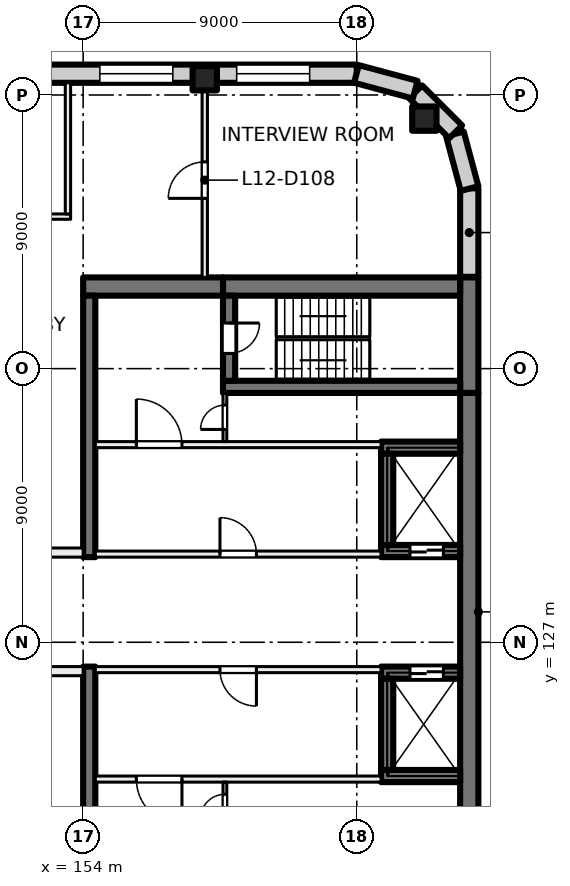
"""IFC4 building model, lengths in metres.
Left out: names, types, materials, properties, quantities, classifications, styles, units other than length and angle.
Written with IfcOpenShell. Run it as: python <this file> out.ifc"""

import sys

from ifc_helpers import new_model, si_unit, direction, frame, frame_2d, origin, origin_2d, place, context, subcontext, project, spatial, rectangle, extrude, element, fill, save


model = new_model("IFC4")
c1 = context("Model", 3, precision=1e-05, world=origin(), true_north=direction((0.0, 1.0)))
c2 = subcontext(c1, "Body", "Model", "MODEL_VIEW")
j1 = project(units=[si_unit("LENGTHUNIT", "METRE"), si_unit("PLANEANGLEUNIT", "RADIAN")], contexts=[c1])
p1 = place(None, origin())
s1 = spatial("IfcSite", under=j1, at=p1, CompositionType="ELEMENT")
p2 = place(p1, origin())
s2 = spatial("IfcBuilding", under=s1, at=p2, CompositionType="ELEMENT")
p3 = place(p2, frame((0.0, 0.0, 55.5)))
s3 = spatial("IfcBuildingStorey", under=s2, at=p3, CompositionType="ELEMENT", Elevation=55.5)
for number, where, z_axis, x_axis in (
    (1, (165.223, 144.223, 0.0), (0.0, 0.0, 1.0), (1.0, 0.0, 0.0)),
    (2, (158.0, 145.55, 0.0), (0.0, 0.0, 1.0), (1.0, 0.0, 0.0)),
):
    element("IfcColumn", number, at=place(p3, frame(where, z_axis=z_axis, x_axis=x_axis)), inside=s3, PredefinedType="COLUMN", context=c2, shape_type="SweptSolid", body=[
        extrude(rectangle(XDim=0.8, YDim=0.8, at=origin_2d()), origin(), (0.0, 0.0, 1.0), 4.0),
    ])
p4 = place(p3, frame((166.7, 139.0, 0.0), z_axis=(0.0, 0.0, 1.0), x_axis=(0.0, -1.0, 0.0)))
e3 = element("IfcWall", 3, at=p4, inside=s3, PredefinedType="SHEAR", context=c2, shape_type="SweptSolid", body=[
    extrude(rectangle(XDim=3.8, YDim=0.6, at=frame_2d((1.9, 0.0))), origin(), (0.0, 0.0, 1.0), 4.0),
])
p5 = place(p3, frame((166.7, 135.2, 0.0), z_axis=(0.0, 0.0, 1.0), x_axis=(0.0, -1.0, 0.0)))
e4 = element("IfcWall", 4, at=p5, inside=s3, PredefinedType="SHEAR", context=c2, shape_type="SweptSolid", body=[
    extrude(rectangle(XDim=14.4, YDim=0.6, at=frame_2d((7.2, 0.0))), origin(), (0.0, 0.0, 1.0), 4.0),
])
p6 = place(p3, frame((166.4, 138.7, 0.0), z_axis=(0.0, 0.0, 1.0), x_axis=(-1.0, 0.0, 0.0)))
e5 = element("IfcWall", 5, at=p6, inside=s3, PredefinedType="SHEAR", context=c2, shape_type="SweptSolid", body=[
    extrude(rectangle(XDim=7.8, YDim=0.6, at=frame_2d((3.9, 0.0))), origin(), (0.0, 0.0, 1.0), 4.0),
])
p7 = place(p3, frame((158.6, 138.7, 0.0), z_axis=(0.0, 0.0, 1.0), x_axis=(-1.0, 0.0, 0.0)))
e6 = element("IfcWall", 6, at=p7, inside=s3, PredefinedType="SHEAR", context=c2, shape_type="SweptSolid", body=[
    extrude(rectangle(XDim=4.6, YDim=0.6, at=frame_2d((2.3, 0.0))), origin(), (0.0, 0.0, 1.0), 4.0),
])
p8 = place(p3, frame((166.4, 135.4, 0.0), z_axis=(0.0, 0.0, 1.0), x_axis=(-1.0, 0.0, 0.0)))
e7 = element("IfcWall", 7, at=p8, inside=s3, PredefinedType="SHEAR", context=c2, shape_type="SweptSolid", body=[
    extrude(rectangle(XDim=7.8, YDim=0.4, at=frame_2d((3.9, 0.0))), origin(), (0.0, 0.0, 1.0), 4.0),
])
p9 = place(p3, frame((158.8, 138.4, 0.0), z_axis=(0.0, 0.0, 1.0), x_axis=(0.0, -1.0, 0.0)))
e8 = element("IfcWall", 8, at=p9, inside=s3, PredefinedType="SHEAR", context=c2, shape_type="SweptSolid", body=[
    extrude(rectangle(XDim=2.8, YDim=0.4, at=frame_2d((1.4, 0.0))), origin(), (0.0, 0.0, 1.0), 4.0),
])
p10 = place(p9, frame((0.9, 0.0, 0.0)))
e9 = element("IfcOpeningElement", 9, at=p10, cuts=e8, PredefinedType="OPENING", context=c2, shape_type="SweptSolid", body=[
    extrude(rectangle(XDim=1.0, YDim=2.1, at=frame_2d((0.5, 1.05))), frame((0.0, 0.21, 0.0), z_axis=(0.0, -1.0, 0.0), x_axis=(1.0, 0.0, 0.0)), (0.0, 0.0, 1.0), 0.42),
])
p11 = place(p3, frame((166.4, 130.0, 0.0), z_axis=(0.0, 0.0, 1.0), x_axis=(-1.0, 0.0, 0.0)))
e10 = element("IfcWall", 10, at=p11, inside=s3, PredefinedType="SHEAR", context=c2, shape_type="SweptSolid", body=[
    extrude(rectangle(XDim=2.6, YDim=0.4, at=frame_2d((1.3, 0.0))), origin(), (0.0, 0.0, 1.0), 4.0),
])
p12 = place(p11, frame((0.55, 0.0, 0.0)))
e11 = element("IfcOpeningElement", 11, at=p12, cuts=e10, PredefinedType="OPENING", context=c2, shape_type="SweptSolid", body=[
    extrude(rectangle(XDim=1.1, YDim=2.1, at=frame_2d((0.55, 1.05))), frame((0.0, 0.21, 0.0), z_axis=(0.0, -1.0, 0.0), x_axis=(1.0, 0.0, 0.0)), (0.0, 0.0, 1.0), 0.42),
])
p13 = place(p3, frame((166.4, 133.4, 0.0), z_axis=(0.0, 0.0, 1.0), x_axis=(-1.0, 0.0, 0.0)))
e12 = element("IfcWall", 12, at=p13, inside=s3, PredefinedType="SHEAR", context=c2, shape_type="SweptSolid", body=[
    extrude(rectangle(XDim=2.6, YDim=0.4, at=frame_2d((1.3, 0.0))), origin(), (0.0, 0.0, 1.0), 4.0),
])
p14 = place(p3, frame((164.0, 133.2, 0.0), z_axis=(0.0, 0.0, 1.0), x_axis=(0.0, -1.0, 0.0)))
e13 = element("IfcWall", 13, at=p14, inside=s3, PredefinedType="SHEAR", context=c2, shape_type="SweptSolid", body=[
    extrude(rectangle(XDim=3.0, YDim=0.4, at=frame_2d((1.5, 0.0))), origin(), (0.0, 0.0, 1.0), 4.0),
])
p15 = place(p3, frame((166.4, 126.0, 0.0), z_axis=(0.0, 0.0, 1.0), x_axis=(-1.0, 0.0, 0.0)))
e14 = element("IfcWall", 14, at=p15, inside=s3, PredefinedType="SHEAR", context=c2, shape_type="SweptSolid", body=[
    extrude(rectangle(XDim=2.6, YDim=0.4, at=frame_2d((1.3, 0.0))), origin(), (0.0, 0.0, 1.0), 4.0),
])
p16 = place(p15, frame((0.55, 0.0, 0.0)))
e15 = element("IfcOpeningElement", 15, at=p16, cuts=e14, PredefinedType="OPENING", context=c2, shape_type="SweptSolid", body=[
    extrude(rectangle(XDim=1.1, YDim=2.1, at=frame_2d((0.55, 1.05))), frame((0.0, 0.21, 0.0), z_axis=(0.0, -1.0, 0.0), x_axis=(1.0, 0.0, 0.0)), (0.0, 0.0, 1.0), 0.42),
])
p17 = place(p3, frame((166.4, 122.6, 0.0), z_axis=(0.0, 0.0, 1.0), x_axis=(-1.0, 0.0, 0.0)))
e16 = element("IfcWall", 16, at=p17, inside=s3, PredefinedType="SHEAR", context=c2, shape_type="SweptSolid", body=[
    extrude(rectangle(XDim=2.6, YDim=0.4, at=frame_2d((1.3, 0.0))), origin(), (0.0, 0.0, 1.0), 4.0),
])
p18 = place(p3, frame((164.0, 125.8, 0.0), z_axis=(0.0, 0.0, 1.0), x_axis=(0.0, -1.0, 0.0)))
e17 = element("IfcWall", 17, at=p18, inside=s3, PredefinedType="SHEAR", context=c2, shape_type="SweptSolid", body=[
    extrude(rectangle(XDim=3.0, YDim=0.4, at=frame_2d((1.5, 0.0))), origin(), (0.0, 0.0, 1.0), 4.0),
])
for number, where, z_axis, x_axis in (
    (18, (154.2, 138.4, 0.0), (0.0, 0.0, 1.0), (0.0, -1.0, 0.0)),
    (19, (154.2, 126.2, 0.0), (0.0, 0.0, 1.0), (0.0, -1.0, 0.0)),
):
    element("IfcWall", number, at=place(p3, frame(where, z_axis=z_axis, x_axis=x_axis)), inside=s3, PredefinedType="SHEAR", context=c2, shape_type="SweptSolid", body=[
        extrude(rectangle(XDim=8.6, YDim=0.4, at=frame_2d((4.3, 0.0))), origin(), (0.0, 0.0, 1.0), 4.0),
    ])
p19 = place(p3, frame((131.07, 145.7, 0.0), z_axis=(0.0, 0.0, 1.0), x_axis=(1.0, 0.0, 0.0)))
e20 = element("IfcWall", 20, at=p19, inside=s3, PredefinedType="SOLIDWALL", context=c2, shape_type="SweptSolid", body=[
    extrude(rectangle(XDim=31.93, YDim=0.6, at=frame_2d((15.965, 0.0))), origin(), (0.0, 0.0, 1.0), 3.625),
])
p20 = place(p19, frame((0.98, 0.0, 0.9)))
e21 = element("IfcOpeningElement", 21, at=p20, cuts=e20, PredefinedType="OPENING", context=c2, shape_type="SweptSolid", body=[
    extrude(rectangle(XDim=2.4, YDim=2.4, at=frame_2d((1.2, 1.2))), frame((0.0, 0.31, 0.0), z_axis=(0.0, -1.0, 0.0), x_axis=(1.0, 0.0, 0.0)), (0.0, 0.0, 1.0), 0.62),
])
p21 = place(p19, frame((5.48, 0.0, 0.9)))
e22 = element("IfcOpeningElement", 22, at=p21, cuts=e20, PredefinedType="OPENING", context=c2, shape_type="SweptSolid", body=[
    extrude(rectangle(XDim=2.4, YDim=2.4, at=frame_2d((1.2, 1.2))), frame((0.0, 0.31, 0.0), z_axis=(0.0, -1.0, 0.0), x_axis=(1.0, 0.0, 0.0)), (0.0, 0.0, 1.0), 0.62),
])
p22 = place(p19, frame((9.98, 0.0, 0.9)))
e23 = element("IfcOpeningElement", 23, at=p22, cuts=e20, PredefinedType="OPENING", context=c2, shape_type="SweptSolid", body=[
    extrude(rectangle(XDim=2.4, YDim=2.4, at=frame_2d((1.2, 1.2))), frame((0.0, 0.31, 0.0), z_axis=(0.0, -1.0, 0.0), x_axis=(1.0, 0.0, 0.0)), (0.0, 0.0, 1.0), 0.62),
])
p23 = place(p19, frame((14.48, 0.0, 0.9)))
e24 = element("IfcOpeningElement", 24, at=p23, cuts=e20, PredefinedType="OPENING", context=c2, shape_type="SweptSolid", body=[
    extrude(rectangle(XDim=2.4, YDim=2.4, at=frame_2d((1.2, 1.2))), frame((0.0, 0.31, 0.0), z_axis=(0.0, -1.0, 0.0), x_axis=(1.0, 0.0, 0.0)), (0.0, 0.0, 1.0), 0.62),
])
p24 = place(p19, frame((18.98, 0.0, 0.9)))
e25 = element("IfcOpeningElement", 25, at=p24, cuts=e20, PredefinedType="OPENING", context=c2, shape_type="SweptSolid", body=[
    extrude(rectangle(XDim=2.4, YDim=2.4, at=frame_2d((1.2, 1.2))), frame((0.0, 0.31, 0.0), z_axis=(0.0, -1.0, 0.0), x_axis=(1.0, 0.0, 0.0)), (0.0, 0.0, 1.0), 0.62),
])
p25 = place(p19, frame((23.48, 0.0, 0.9)))
e26 = element("IfcOpeningElement", 26, at=p25, cuts=e20, PredefinedType="OPENING", context=c2, shape_type="SweptSolid", body=[
    extrude(rectangle(XDim=2.4, YDim=2.4, at=frame_2d((1.2, 1.2))), frame((0.0, 0.31, 0.0), z_axis=(0.0, -1.0, 0.0), x_axis=(1.0, 0.0, 0.0)), (0.0, 0.0, 1.0), 0.62),
])
p26 = place(p19, frame((27.98, 0.0, 0.9)))
e27 = element("IfcOpeningElement", 27, at=p26, cuts=e20, PredefinedType="OPENING", context=c2, shape_type="SweptSolid", body=[
    extrude(rectangle(XDim=2.4, YDim=2.4, at=frame_2d((1.2, 1.2))), frame((0.0, 0.31, 0.0), z_axis=(0.0, -1.0, 0.0), x_axis=(1.0, 0.0, 0.0)), (0.0, 0.0, 1.0), 0.62),
])
p27 = place(p3, frame((166.7, 141.93, 0.0), z_axis=(0.0, 0.0, 1.0), x_axis=(0.0, -1.0, 0.0)))
e28 = element("IfcWall", 28, at=p27, inside=s3, PredefinedType="SOLIDWALL", context=c2, shape_type="SweptSolid", body=[
    extrude(rectangle(XDim=2.91, YDim=0.6, at=frame_2d((1.455, 0.0))), origin(), (0.0, 0.0, 1.0), 3.625),
])
for number, where, z_axis, x_axis in (
    (29, (166.229, 143.719, 0.0), (0.0, 0.0, 1.0), (0.259, -0.966, 0.0)),
    (30, (164.936, 145.104, 0.0), (0.0, 0.0, 1.0), (0.707, -0.707, 0.0)),
):
    element("IfcWall", number, at=place(p3, frame(where, z_axis=z_axis, x_axis=x_axis)), inside=s3, PredefinedType="SOLIDWALL", context=c2, shape_type="SweptSolid", body=[
        extrude(rectangle(XDim=1.861, YDim=0.6, at=frame_2d((0.93, 0.0))), origin(), (0.0, 0.0, 1.0), 3.625),
    ])
p28 = place(p3, frame((162.99, 145.692, 0.0), z_axis=(0.0, 0.0, 1.0), x_axis=(0.965920269068, -0.258839784042, 0.0)))
e31 = element("IfcWall", 31, at=p28, inside=s3, PredefinedType="SOLIDWALL", context=c2, shape_type="SweptSolid", body=[
    extrude(rectangle(XDim=2.0, YDim=0.6, at=frame_2d((1.0, 0.0))), origin(), (0.0, 0.0, 1.0), 3.625),
])
p29 = place(p3, frame((163.8, 126.1, 0.0), z_axis=(0.0, 0.0, 1.0), x_axis=(-1.0, 0.0, 0.0)))
e32 = element("IfcWall", 32, at=p29, inside=s3, PredefinedType="PARTITIONING", context=c2, shape_type="SweptSolid", body=[
    extrude(rectangle(XDim=9.4, YDim=0.2, at=frame_2d((4.7, 0.0))), origin(), (0.0, 0.0, 1.0), 3.625),
])
p30 = place(p29, frame((4.1, 0.0, 0.0)))
e33 = element("IfcOpeningElement", 33, at=p30, cuts=e32, PredefinedType="OPENING", context=c2, shape_type="SweptSolid", body=[
    extrude(rectangle(XDim=1.2, YDim=2.1, at=frame_2d((0.6, 1.05))), frame((0.0, 0.11, 0.0), z_axis=(0.0, -1.0, 0.0), x_axis=(1.0, 0.0, 0.0)), (0.0, 0.0, 1.0), 0.22),
])
p31 = place(p3, frame((163.8, 122.5, 0.0), z_axis=(0.0, 0.0, 1.0), x_axis=(-1.0, 0.0, 0.0)))
e34 = element("IfcWall", 34, at=p31, inside=s3, PredefinedType="PARTITIONING", context=c2, shape_type="SweptSolid", body=[
    extrude(rectangle(XDim=9.4, YDim=0.2, at=frame_2d((4.7, 0.0))), origin(), (0.0, 0.0, 1.0), 3.625),
])
p32 = place(p31, frame((6.55, 0.0, 0.0)))
e35 = element("IfcOpeningElement", 35, at=p32, cuts=e34, PredefinedType="OPENING", context=c2, shape_type="SweptSolid", body=[
    extrude(rectangle(XDim=1.5, YDim=2.1, at=frame_2d((0.75, 1.05))), frame((0.0, 0.11, 0.0), z_axis=(0.0, -1.0, 0.0), x_axis=(1.0, 0.0, 0.0)), (0.0, 0.0, 1.0), 0.22),
])
p33 = place(p3, frame((158.663, 120.8, 0.0), z_axis=(0.0, 0.0, 1.0), x_axis=(0.0, 1.0, 0.0)))
e36 = element("IfcWall", 36, at=p33, inside=s3, PredefinedType="PARTITIONING", context=c2, shape_type="SweptSolid", body=[
    extrude(rectangle(XDim=1.6, YDim=0.125, at=frame_2d((0.8, 0.0))), origin(), (0.0, 0.0, 1.0), 3.625),
])
p34 = place(p33, frame((0.4, 0.0, 0.0)))
e37 = element("IfcOpeningElement", 37, at=p34, cuts=e36, PredefinedType="OPENING", context=c2, shape_type="SweptSolid", body=[
    extrude(rectangle(XDim=0.8, YDim=2.1, at=frame_2d((0.4, 1.05))), frame((0.0, 0.073, 0.0), z_axis=(0.0, -1.0, 0.0), x_axis=(1.0, 0.0, 0.0)), (0.0, 0.0, 1.0), 0.145),
])
p35 = place(p3, frame((154.4, 129.9, 0.0), z_axis=(0.0, 0.0, 1.0), x_axis=(1.0, 0.0, 0.0)))
e38 = element("IfcWall", 38, at=p35, inside=s3, PredefinedType="PARTITIONING", context=c2, shape_type="SweptSolid", body=[
    extrude(rectangle(XDim=9.4, YDim=0.2, at=frame_2d((4.7, 0.0))), origin(), (0.0, 0.0, 1.0), 3.625),
])
p36 = place(p35, frame((4.1, 0.0, 0.0)))
e39 = element("IfcOpeningElement", 39, at=p36, cuts=e38, PredefinedType="OPENING", context=c2, shape_type="SweptSolid", body=[
    extrude(rectangle(XDim=1.2, YDim=2.1, at=frame_2d((0.6, 1.05))), frame((0.0, 0.11, 0.0), z_axis=(0.0, -1.0, 0.0), x_axis=(1.0, 0.0, 0.0)), (0.0, 0.0, 1.0), 0.22),
])
p37 = place(p3, frame((154.4, 133.5, 0.0), z_axis=(0.0, 0.0, 1.0), x_axis=(1.0, 0.0, 0.0)))
e40 = element("IfcWall", 40, at=p37, inside=s3, PredefinedType="PARTITIONING", context=c2, shape_type="SweptSolid", body=[
    extrude(rectangle(XDim=9.4, YDim=0.2, at=frame_2d((4.7, 0.0))), origin(), (0.0, 0.0, 1.0), 3.625),
])
p38 = place(p37, frame((1.35, 0.0, 0.0)))
e41 = element("IfcOpeningElement", 41, at=p38, cuts=e40, PredefinedType="OPENING", context=c2, shape_type="SweptSolid", body=[
    extrude(rectangle(XDim=1.5, YDim=2.1, at=frame_2d((0.75, 1.05))), frame((0.0, 0.11, 0.0), z_axis=(0.0, -1.0, 0.0), x_axis=(1.0, 0.0, 0.0)), (0.0, 0.0, 1.0), 0.22),
])
p39 = place(p3, frame((158.663, 133.6, 0.0), z_axis=(0.0, 0.0, 1.0), x_axis=(0.0, 1.0, 0.0)))
e42 = element("IfcWall", 42, at=p39, inside=s3, PredefinedType="PARTITIONING", context=c2, shape_type="SweptSolid", body=[
    extrude(rectangle(XDim=1.6, YDim=0.125, at=frame_2d((0.8, 0.0))), origin(), (0.0, 0.0, 1.0), 3.625),
])
p40 = place(p39, frame((0.4, 0.0, 0.0)))
e43 = element("IfcOpeningElement", 43, at=p40, cuts=e42, PredefinedType="OPENING", context=c2, shape_type="SweptSolid", body=[
    extrude(rectangle(XDim=0.8, YDim=2.1, at=frame_2d((0.4, 1.05))), frame((0.0, 0.073, 0.0), z_axis=(0.0, -1.0, 0.0), x_axis=(1.0, 0.0, 0.0)), (0.0, 0.0, 1.0), 0.145),
])
p41 = place(p3, frame((140.0, 129.95, 0.0), z_axis=(0.0, 0.0, 1.0), x_axis=(1.0, 0.0, 0.0)))
e44 = element("IfcWall", 44, at=p41, inside=s3, PredefinedType="PARTITIONING", context=c2, shape_type="SweptSolid", body=[
    extrude(rectangle(XDim=14.0, YDim=0.3, at=frame_2d((7.0, 0.0))), origin(), (0.0, 0.0, 1.0), 3.625),
])
p42 = place(p41, frame((5.25, 0.0, 0.0)))
e45 = element("IfcOpeningElement", 45, at=p42, cuts=e44, PredefinedType="OPENING", context=c2, shape_type="SweptSolid", body=[
    extrude(rectangle(XDim=1.0, YDim=2.1, at=frame_2d((0.5, 1.05))), frame((0.0, 0.16, 0.0), z_axis=(0.0, -1.0, 0.0), x_axis=(1.0, 0.0, 0.0)), (0.0, 0.0, 1.0), 0.32),
])
p43 = place(p41, frame((10.6, 0.0, 0.0)))
e46 = element("IfcOpeningElement", 46, at=p43, cuts=e44, PredefinedType="OPENING", context=c2, shape_type="SweptSolid", body=[
    extrude(rectangle(XDim=1.8, YDim=2.1, at=frame_2d((0.9, 1.05))), frame((0.0, 0.16, 0.0), z_axis=(0.0, -1.0, 0.0), x_axis=(1.0, 0.0, 0.0)), (0.0, 0.0, 1.0), 0.32),
])
p44 = place(p3, frame((153.588, 141.0, 0.0), z_axis=(0.0, 0.0, 1.0), x_axis=(-1.0, 0.0, 0.0)))
e47 = element("IfcWall", 47, at=p44, inside=s3, PredefinedType="PARTITIONING", context=c2, shape_type="SweptSolid", body=[
    extrude(rectangle(XDim=4.676, YDim=0.175, at=frame_2d((2.338, 0.0))), origin(), (0.0, 0.0, 1.0), 3.625),
])
p45 = place(p44, frame((1.738, 0.0, 0.0)))
e48 = element("IfcOpeningElement", 48, at=p45, cuts=e47, PredefinedType="OPENING", context=c2, shape_type="SweptSolid", body=[
    extrude(rectangle(XDim=1.2, YDim=2.1, at=frame_2d((0.6, 1.05))), frame((0.0, 0.097, 0.0), z_axis=(0.0, -1.0, 0.0), x_axis=(1.0, 0.0, 0.0)), (0.0, 0.0, 1.0), 0.195),
])
p46 = place(p3, frame((153.5, 145.4, 0.0), z_axis=(0.0, 0.0, 1.0), x_axis=(0.0, -1.0, 0.0)))
e49 = element("IfcWall", 49, at=p46, inside=s3, PredefinedType="PARTITIONING", context=c2, shape_type="SweptSolid", body=[
    extrude(rectangle(XDim=4.312, YDim=0.175, at=frame_2d((2.156, 0.0))), origin(), (0.0, 0.0, 1.0), 3.625),
])
p47 = place(p3, frame((154.0, 126.05, 0.0), z_axis=(0.0, 0.0, 1.0), x_axis=(-1.0, 0.0, 0.0)))
e50 = element("IfcWall", 50, at=p47, inside=s3, PredefinedType="PARTITIONING", context=c2, shape_type="SweptSolid", body=[
    extrude(rectangle(XDim=14.0, YDim=0.3, at=frame_2d((7.0, 0.0))), origin(), (0.0, 0.0, 1.0), 3.625),
])
p48 = place(p47, frame((6.1, 0.0, 0.0)))
e51 = element("IfcOpeningElement", 51, at=p48, cuts=e50, PredefinedType="OPENING", context=c2, shape_type="SweptSolid", body=[
    extrude(rectangle(XDim=1.8, YDim=2.1, at=frame_2d((0.9, 1.05))), frame((0.0, 0.16, 0.0), z_axis=(0.0, -1.0, 0.0), x_axis=(1.0, 0.0, 0.0)), (0.0, 0.0, 1.0), 0.32),
])
p49 = place(p3, frame((158.0, 139.0, 0.0), z_axis=(0.0, 0.0, 1.0), x_axis=(0.0, 1.0, 0.0)))
e52 = element("IfcWall", 52, at=p49, inside=s3, PredefinedType="PARTITIONING", context=c2, shape_type="SweptSolid", body=[
    extrude(rectangle(XDim=6.4, YDim=0.175, at=frame_2d((3.2, 0.0))), origin(), (0.0, 0.0, 1.0), 3.625),
])
p50 = place(p49, frame((2.6, 0.0, 0.0)))
e53 = element("IfcOpeningElement", 53, at=p50, cuts=e52, PredefinedType="OPENING", context=c2, shape_type="SweptSolid", body=[
    extrude(rectangle(XDim=1.2, YDim=2.1, at=frame_2d((0.6, 1.05))), frame((0.0, 0.097, 0.0), z_axis=(0.0, -1.0, 0.0), x_axis=(1.0, 0.0, 0.0)), (0.0, 0.0, 1.0), 0.195),
])
p51 = place(p25, origin())
e54 = element("IfcWindow", 54, at=p51, inside=s3, PartitioningType="SINGLE_PANEL", PredefinedType="WINDOW", context=c2, shape_type="SweptSolid", body=[
    extrude(rectangle(XDim=2.4, YDim=2.4, at=frame_2d((1.2, 1.2))), frame((0.0, 0.03, 0.0), z_axis=(0.0, -1.0, 0.0), x_axis=(1.0, 0.0, 0.0)), (0.0, 0.0, 1.0), 0.06),
])
fill(e26, e54)
p52 = place(p26, origin())
e55 = element("IfcWindow", 55, at=p52, inside=s3, PartitioningType="SINGLE_PANEL", PredefinedType="WINDOW", context=c2, shape_type="SweptSolid", body=[
    extrude(rectangle(XDim=2.4, YDim=2.4, at=frame_2d((1.2, 1.2))), frame((0.0, 0.03, 0.0), z_axis=(0.0, -1.0, 0.0), x_axis=(1.0, 0.0, 0.0)), (0.0, 0.0, 1.0), 0.06),
])
fill(e27, e55)
p53 = place(p16, origin())
e56 = element("IfcDoor", 56, at=p53, inside=s3, OperationType="DOUBLE_DOOR_SLIDING", PredefinedType="DOOR", context=c2, shape_type="SweptSolid", body=[
    extrude(rectangle(XDim=1.1, YDim=2.1, at=frame_2d((0.55, 1.05))), frame((0.0, 0.025, 0.0), z_axis=(0.0, -1.0, 0.0), x_axis=(1.0, 0.0, 0.0)), (0.0, 0.0, 1.0), 0.05),
])
fill(e15, e56)
p54 = place(p12, origin())
e57 = element("IfcDoor", 57, at=p54, inside=s3, OperationType="DOUBLE_DOOR_SLIDING", PredefinedType="DOOR", context=c2, shape_type="SweptSolid", body=[
    extrude(rectangle(XDim=1.1, YDim=2.1, at=frame_2d((0.55, 1.05))), frame((0.0, 0.025, 0.0), z_axis=(0.0, -1.0, 0.0), x_axis=(1.0, 0.0, 0.0)), (0.0, 0.0, 1.0), 0.05),
])
fill(e11, e57)
p55 = place(p30, origin())
e58 = element("IfcDoor", 58, at=p55, inside=s3, OperationType="DOUBLE_DOOR_SINGLE_SWING", PredefinedType="DOOR", context=c2, shape_type="SweptSolid", body=[
    extrude(rectangle(XDim=1.2, YDim=2.1, at=frame_2d((0.6, 1.05))), frame((0.0, 0.025, 0.0), z_axis=(0.0, -1.0, 0.0), x_axis=(1.0, 0.0, 0.0)), (0.0, 0.0, 1.0), 0.05),
])
fill(e33, e58)
p56 = place(p32, origin())
e59 = element("IfcDoor", 59, at=p56, inside=s3, OperationType="DOUBLE_DOOR_SINGLE_SWING", PredefinedType="DOOR", context=c2, shape_type="SweptSolid", body=[
    extrude(rectangle(XDim=1.5, YDim=2.1, at=frame_2d((0.75, 1.05))), frame((0.0, 0.025, 0.0), z_axis=(0.0, -1.0, 0.0), x_axis=(1.0, 0.0, 0.0)), (0.0, 0.0, 1.0), 0.05),
])
fill(e35, e59)
p57 = place(p34, origin())
e60 = element("IfcDoor", 60, at=p57, inside=s3, OperationType="SINGLE_SWING_RIGHT", PredefinedType="DOOR", context=c2, shape_type="SweptSolid", body=[
    extrude(rectangle(XDim=0.8, YDim=2.1, at=frame_2d((0.4, 1.05))), frame((0.0, 0.025, 0.0), z_axis=(0.0, -1.0, 0.0), x_axis=(1.0, 0.0, 0.0)), (0.0, 0.0, 1.0), 0.05),
])
fill(e37, e60)
p58 = place(p36, origin())
e61 = element("IfcDoor", 61, at=p58, inside=s3, OperationType="DOUBLE_DOOR_SINGLE_SWING", PredefinedType="DOOR", context=c2, shape_type="SweptSolid", body=[
    extrude(rectangle(XDim=1.2, YDim=2.1, at=frame_2d((0.6, 1.05))), frame((0.0, 0.025, 0.0), z_axis=(0.0, -1.0, 0.0), x_axis=(1.0, 0.0, 0.0)), (0.0, 0.0, 1.0), 0.05),
])
fill(e39, e61)
p59 = place(p38, origin())
e62 = element("IfcDoor", 62, at=p59, inside=s3, OperationType="DOUBLE_DOOR_SINGLE_SWING", PredefinedType="DOOR", context=c2, shape_type="SweptSolid", body=[
    extrude(rectangle(XDim=1.5, YDim=2.1, at=frame_2d((0.75, 1.05))), frame((0.0, 0.025, 0.0), z_axis=(0.0, -1.0, 0.0), x_axis=(1.0, 0.0, 0.0)), (0.0, 0.0, 1.0), 0.05),
])
fill(e41, e62)
p60 = place(p10, origin())
e63 = element("IfcDoor", 63, at=p60, inside=s3, OperationType="SINGLE_SWING_RIGHT", PredefinedType="DOOR", context=c2, shape_type="SweptSolid", body=[
    extrude(rectangle(XDim=1.0, YDim=2.1, at=frame_2d((0.5, 1.05))), frame((0.0, 0.025, 0.0), z_axis=(0.0, -1.0, 0.0), x_axis=(1.0, 0.0, 0.0)), (0.0, 0.0, 1.0), 0.05),
])
fill(e9, e63)
p61 = place(p40, origin())
e64 = element("IfcDoor", 64, at=p61, inside=s3, OperationType="SINGLE_SWING_LEFT", PredefinedType="DOOR", context=c2, shape_type="SweptSolid", body=[
    extrude(rectangle(XDim=0.8, YDim=2.1, at=frame_2d((0.4, 1.05))), frame((0.0, 0.025, 0.0), z_axis=(0.0, -1.0, 0.0), x_axis=(1.0, 0.0, 0.0)), (0.0, 0.0, 1.0), 0.05),
])
fill(e43, e64)
p62 = place(p50, origin())
e65 = element("IfcDoor", 65, at=p62, inside=s3, OperationType="DOUBLE_DOOR_SINGLE_SWING", PredefinedType="DOOR", context=c2, shape_type="SweptSolid", body=[
    extrude(rectangle(XDim=1.2, YDim=2.1, at=frame_2d((0.6, 1.05))), frame((0.0, 0.025, 0.0), z_axis=(0.0, -1.0, 0.0), x_axis=(1.0, 0.0, 0.0)), (0.0, 0.0, 1.0), 0.05),
])
fill(e53, e65)
save(model, sys.argv[1])
